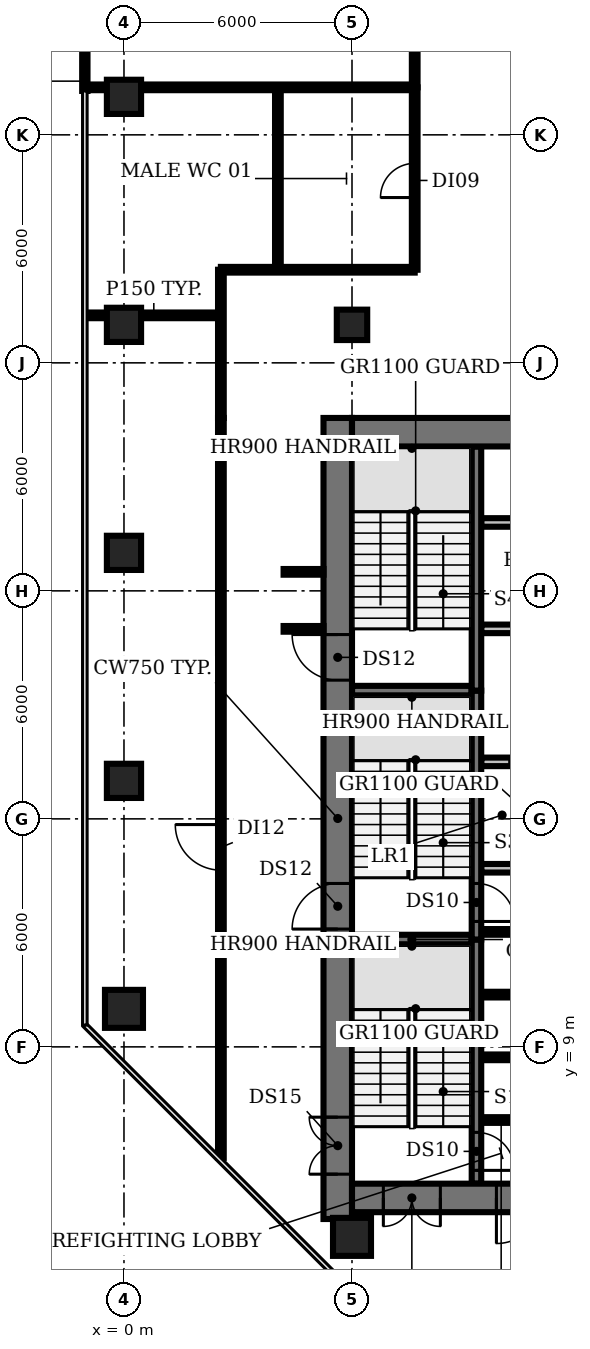
"""IFC4 building model, lengths in metres.
Left out: names, types, materials, properties, quantities, classifications, styles, units other than length and angle.
Written with IfcOpenShell. Run it as: python <this file> out.ifc"""

import sys

from ifc_helpers import new_model, si_unit, direction, frame, frame_2d, origin, origin_2d, place, context, subcontext, project, spatial, rectangle, circle, extrude, element, fill, save


model = new_model("IFC4")
c1 = context("Model", 3, precision=1e-05, world=origin(), true_north=direction((0.0, 1.0)))
c2 = subcontext(c1, "Body", "Model", "MODEL_VIEW")
j1 = project(units=[si_unit("LENGTHUNIT", "METRE"), si_unit("PLANEANGLEUNIT", "RADIAN")], contexts=[c1])
p1 = place(None, origin())
s1 = spatial("IfcSite", under=j1, at=p1, CompositionType="ELEMENT")
p2 = place(p1, origin())
s2 = spatial("IfcBuilding", under=s1, at=p2, CompositionType="ELEMENT")
p3 = place(p2, frame((0.0, 0.0, 96.2)))
s3 = spatial("IfcBuildingStorey", under=s2, at=p3, CompositionType="ELEMENT", Elevation=96.2)
p4 = place(p3, frame((0.0, 10.0, 0.0), z_axis=(0.0, 0.0, 1.0), x_axis=(1.0, 0.0, 0.0)))
e1 = element("IfcColumn", 1, at=p4, inside=s3, PredefinedType="COLUMN", context=c2, shape_type="SweptSolid", body=[
    extrude(circle(Radius=0.5, at=origin_2d()), origin(), (0.0, 0.0, 1.0), 3.85),
])
for number, where, z_axis, x_axis in (
    (2, (0.0, 16.0, 0.0), (0.0, 0.0, 1.0), (1.0, 0.0, 0.0)),
    (3, (0.0, 22.0, 0.0), (0.0, 0.0, 1.0), (1.0, 0.0, 0.0)),
    (4, (0.0, 28.0, 0.0), (0.0, 0.0, 1.0), (1.0, 0.0, 0.0)),
    (5, (0.0, 34.0, 0.0), (0.0, 0.0, 1.0), (1.0, 0.0, 0.0)),
):
    element("IfcColumn", number, at=place(p3, frame(where, z_axis=z_axis, x_axis=x_axis)), inside=s3, PredefinedType="COLUMN", context=c2, shape_type="SweptSolid", body=[
        extrude(rectangle(XDim=0.9, YDim=0.9, at=origin_2d()), origin(), (0.0, 0.0, 1.0), 3.85),
    ])
p5 = place(p3, frame((6.0, 4.0, 0.0), z_axis=(0.0, 0.0, 1.0), x_axis=(1.0, 0.0, 0.0)))
e6 = element("IfcColumn", 6, at=p5, inside=s3, PredefinedType="COLUMN", context=c2, shape_type="SweptSolid", body=[
    extrude(circle(Radius=0.5, at=origin_2d()), origin(), (0.0, 0.0, 1.0), 3.85),
])
p6 = place(p3, frame((6.0, 28.0, 0.0), z_axis=(0.0, 0.0, 1.0), x_axis=(1.0, 0.0, 0.0)))
e7 = element("IfcColumn", 7, at=p6, inside=s3, PredefinedType="COLUMN", context=c2, shape_type="SweptSolid", body=[
    extrude(rectangle(XDim=0.8, YDim=0.8, at=origin_2d()), origin(), (0.0, 0.0, 1.0), 3.85),
])
p7 = place(p3, frame((-1.03, 40.302, 0.0), z_axis=(0.0, 0.0, 1.0), x_axis=(0.0, -1.0, 0.0)))
e8 = element("IfcWall", 8, at=p7, inside=s3, PredefinedType="SOLIDWALL", context=c2, shape_type="SweptSolid", body=[
    extrude(rectangle(XDim=6.146, YDim=0.14, at=frame_2d((3.073, 0.0))), origin(), (0.0, 0.0, 1.0), 3.85),
])
p8 = place(p7, frame((2.173, 0.0, 0.0)))
e9 = element("IfcOpeningElement", 9, at=p8, cuts=e8, PredefinedType="OPENING", context=c2, shape_type="SweptSolid", body=[
    extrude(rectangle(XDim=1.8, YDim=2.4, at=frame_2d((0.9, 1.2))), frame((0.0, 0.08, 0.0), z_axis=(0.0, -1.0, 0.0), x_axis=(1.0, 0.0, 0.0)), (0.0, 0.0, 1.0), 0.16),
])
for number, where, z_axis, x_axis in (
    (10, (9.4, 7.075, 0.0), (0.0, 0.0, 1.0), (1.0, 0.0, 0.0)),
    (11, (9.4, 8.725, 0.0), (0.0, 0.0, 1.0), (1.0, 0.0, 0.0)),
    (12, (9.4, 10.375, 0.0), (0.0, 0.0, 1.0), (1.0, 0.0, 0.0)),
):
    element("IfcWall", number, at=place(p3, frame(where, z_axis=z_axis, x_axis=x_axis)), inside=s3, PredefinedType="SHEAR", context=c2, shape_type="SweptSolid", body=[
        extrude(rectangle(XDim=1.05, YDim=0.15, at=frame_2d((0.525, 0.0))), origin(), (0.0, 0.0, 1.0), 3.85),
    ])
p9 = place(p3, frame((6.0, 11.825, 0.0), z_axis=(0.0, 0.0, 1.0), x_axis=(1.0, 0.0, 0.0)))
e13 = element("IfcWall", 13, at=p9, inside=s3, PredefinedType="SHEAR", context=c2, shape_type="SweptSolid", body=[
    extrude(rectangle(XDim=3.15, YDim=0.25, at=frame_2d((1.575, 0.0))), origin(), (0.0, 0.0, 1.0), 3.85),
])
p10 = place(p3, frame((9.4, 12.025, 0.0), z_axis=(0.0, 0.0, 1.0), x_axis=(1.0, 0.0, 0.0)))
e14 = element("IfcWall", 14, at=p10, inside=s3, PredefinedType="SHEAR", context=c2, shape_type="SweptSolid", body=[
    extrude(rectangle(XDim=1.05, YDim=0.15, at=frame_2d((0.525, 0.0))), origin(), (0.0, 0.0, 1.0), 3.85),
])
p11 = place(p3, frame((9.4, 13.7, 0.0), z_axis=(0.0, 0.0, 1.0), x_axis=(1.0, 0.0, 0.0)))
e15 = element("IfcWall", 15, at=p11, inside=s3, PredefinedType="PARTITIONING", context=c2, shape_type="SweptSolid", body=[
    extrude(rectangle(XDim=4.0, YDim=0.225, at=frame_2d((2.0, 0.0))), origin(), (0.0, 0.0, 1.0), 3.85),
])
p12 = place(p3, frame((9.4, 16.5, 0.0), z_axis=(0.0, 0.0, 1.0), x_axis=(1.0, 0.0, 0.0)))
e16 = element("IfcWall", 16, at=p12, inside=s3, PredefinedType="PARTITIONING", context=c2, shape_type="SweptSolid", body=[
    extrude(rectangle(XDim=14.6, YDim=0.225, at=frame_2d((7.3, 0.0))), origin(), (0.0, 0.0, 1.0), 3.85),
])
p13 = place(p12, frame((0.75, 0.0, 0.0)))
e17 = element("IfcOpeningElement", 17, at=p13, cuts=e16, PredefinedType="OPENING", context=c2, shape_type="SweptSolid", body=[
    extrude(rectangle(XDim=1.1, YDim=2.1, at=frame_2d((0.55, 1.05))), frame((0.0, 0.123, 0.0), z_axis=(0.0, -1.0, 0.0), x_axis=(1.0, 0.0, 0.0)), (0.0, 0.0, 1.0), 0.245),
])
p14 = place(p12, frame((3.55, 0.0, 0.0)))
e18 = element("IfcOpeningElement", 18, at=p14, cuts=e16, PredefinedType="OPENING", context=c2, shape_type="SweptSolid", body=[
    extrude(rectangle(XDim=1.1, YDim=2.1, at=frame_2d((0.55, 1.05))), frame((0.0, 0.123, 0.0), z_axis=(0.0, -1.0, 0.0), x_axis=(1.0, 0.0, 0.0)), (0.0, 0.0, 1.0), 0.245),
])
p15 = place(p12, frame((6.35, 0.0, 0.0)))
e19 = element("IfcOpeningElement", 19, at=p15, cuts=e16, PredefinedType="OPENING", context=c2, shape_type="SweptSolid", body=[
    extrude(rectangle(XDim=1.1, YDim=2.1, at=frame_2d((0.55, 1.05))), frame((0.0, 0.123, 0.0), z_axis=(0.0, -1.0, 0.0), x_axis=(1.0, 0.0, 0.0)), (0.0, 0.0, 1.0), 0.245),
])
p16 = place(p12, frame((9.15, 0.0, 0.0)))
e20 = element("IfcOpeningElement", 20, at=p16, cuts=e16, PredefinedType="OPENING", context=c2, shape_type="SweptSolid", body=[
    extrude(rectangle(XDim=1.1, YDim=2.1, at=frame_2d((0.55, 1.05))), frame((0.0, 0.123, 0.0), z_axis=(0.0, -1.0, 0.0), x_axis=(1.0, 0.0, 0.0)), (0.0, 0.0, 1.0), 0.245),
])
p17 = place(p12, frame((11.647, 0.0, 0.0)))
e21 = element("IfcOpeningElement", 21, at=p17, cuts=e16, PredefinedType="OPENING", context=c2, shape_type="SweptSolid", body=[
    extrude(rectangle(XDim=0.9, YDim=2.1, at=frame_2d((0.45, 1.05))), frame((0.0, 0.123, 0.0), z_axis=(0.0, -1.0, 0.0), x_axis=(1.0, 0.0, 0.0)), (0.0, 0.0, 1.0), 0.245),
])
p18 = place(p12, frame((13.423, 0.0, 0.0)))
e22 = element("IfcOpeningElement", 22, at=p18, cuts=e16, PredefinedType="OPENING", context=c2, shape_type="SweptSolid", body=[
    extrude(rectangle(XDim=0.9, YDim=2.1, at=frame_2d((0.45, 1.05))), frame((0.0, 0.123, 0.0), z_axis=(0.0, -1.0, 0.0), x_axis=(1.0, 0.0, 0.0)), (0.0, 0.0, 1.0), 0.245),
])
p19 = place(p3, frame((6.0, 18.375, 0.0), z_axis=(0.0, 0.0, 1.0), x_axis=(1.0, 0.0, 0.0)))
e23 = element("IfcWall", 23, at=p19, inside=s3, PredefinedType="SHEAR", context=c2, shape_type="SweptSolid", body=[
    extrude(rectangle(XDim=3.15, YDim=0.25, at=frame_2d((1.575, 0.0))), origin(), (0.0, 0.0, 1.0), 3.85),
])
p20 = place(p3, frame((24.0, 20.0, 0.0), z_axis=(0.0, 0.0, 1.0), x_axis=(-1.0, 0.0, 0.0)))
e24 = element("IfcWall", 24, at=p20, inside=s3, PredefinedType="PARTITIONING", context=c2, shape_type="SweptSolid", body=[
    extrude(rectangle(XDim=14.6, YDim=0.225, at=frame_2d((7.3, 0.0))), origin(), (0.0, 0.0, 1.0), 3.85),
])
p21 = place(p20, frame((12.5, 0.0, 0.0)))
e25 = element("IfcOpeningElement", 25, at=p21, cuts=e24, PredefinedType="OPENING", context=c2, shape_type="SweptSolid", body=[
    extrude(rectangle(XDim=1.0, YDim=2.1, at=frame_2d((0.5, 1.05))), frame((0.0, 0.123, 0.0), z_axis=(0.0, -1.0, 0.0), x_axis=(1.0, 0.0, 0.0)), (0.0, 0.0, 1.0), 0.245),
])
p22 = place(p20, frame((8.825, 0.0, 0.0)))
e26 = element("IfcOpeningElement", 26, at=p22, cuts=e24, PredefinedType="OPENING", context=c2, shape_type="SweptSolid", body=[
    extrude(rectangle(XDim=1.0, YDim=2.1, at=frame_2d((0.5, 1.05))), frame((0.0, 0.123, 0.0), z_axis=(0.0, -1.0, 0.0), x_axis=(1.0, 0.0, 0.0)), (0.0, 0.0, 1.0), 0.245),
])
p23 = place(p20, frame((4.925, 0.0, 0.0)))
e27 = element("IfcOpeningElement", 27, at=p23, cuts=e24, PredefinedType="OPENING", context=c2, shape_type="SweptSolid", body=[
    extrude(rectangle(XDim=1.0, YDim=2.1, at=frame_2d((0.5, 1.05))), frame((0.0, 0.123, 0.0), z_axis=(0.0, -1.0, 0.0), x_axis=(1.0, 0.0, 0.0)), (0.0, 0.0, 1.0), 0.245),
])
p24 = place(p20, frame((2.137, 0.0, 0.0)))
e28 = element("IfcOpeningElement", 28, at=p24, cuts=e24, PredefinedType="OPENING", context=c2, shape_type="SweptSolid", body=[
    extrude(rectangle(XDim=0.9, YDim=2.1, at=frame_2d((0.45, 1.05))), frame((0.0, 0.123, 0.0), z_axis=(0.0, -1.0, 0.0), x_axis=(1.0, 0.0, 0.0)), (0.0, 0.0, 1.0), 0.245),
])
p25 = place(p20, frame((0.363, 0.0, 0.0)))
e29 = element("IfcOpeningElement", 29, at=p25, cuts=e24, PredefinedType="OPENING", context=c2, shape_type="SweptSolid", body=[
    extrude(rectangle(XDim=0.9, YDim=2.1, at=frame_2d((0.45, 1.05))), frame((0.0, 0.123, 0.0), z_axis=(0.0, -1.0, 0.0), x_axis=(1.0, 0.0, 0.0)), (0.0, 0.0, 1.0), 0.245),
])
p26 = place(p3, frame((9.4, 22.8, 0.0), z_axis=(0.0, 0.0, 1.0), x_axis=(1.0, 0.0, 0.0)))
e30 = element("IfcWall", 30, at=p26, inside=s3, PredefinedType="PARTITIONING", context=c2, shape_type="SweptSolid", body=[
    extrude(rectangle(XDim=14.6, YDim=0.225, at=frame_2d((7.3, 0.0))), origin(), (0.0, 0.0, 1.0), 3.85),
])
p27 = place(p3, frame((9.275, 11.825, 0.0), z_axis=(0.0, 0.0, 1.0), x_axis=(0.0, -1.0, 0.0)))
e31 = element("IfcWall", 31, at=p27, inside=s3, PredefinedType="SHEAR", context=c2, shape_type="SweptSolid", body=[
    extrude(rectangle(XDim=6.425, YDim=0.25, at=frame_2d((3.212, 0.0))), origin(), (0.0, 0.0, 1.0), 3.85),
])
p28 = place(p27, frame((5.075, 0.0, 0.0)))
e32 = element("IfcOpeningElement", 32, at=p28, cuts=e31, PredefinedType="OPENING", context=c2, shape_type="SweptSolid", body=[
    extrude(rectangle(XDim=1.0, YDim=2.1, at=frame_2d((0.5, 1.05))), frame((0.0, 0.135, 0.0), z_axis=(0.0, -1.0, 0.0), x_axis=(1.0, 0.0, 0.0)), (0.0, 0.0, 1.0), 0.27),
])
p29 = place(p3, frame((9.275, 18.375, 0.0), z_axis=(0.0, 0.0, 1.0), x_axis=(0.0, -1.0, 0.0)))
e33 = element("IfcWall", 33, at=p29, inside=s3, PredefinedType="SHEAR", context=c2, shape_type="SweptSolid", body=[
    extrude(rectangle(XDim=6.55, YDim=0.25, at=frame_2d((3.275, 0.0))), origin(), (0.0, 0.0, 1.0), 3.85),
])
p30 = place(p29, frame((5.075, 0.0, 0.0)))
e34 = element("IfcOpeningElement", 34, at=p30, cuts=e33, PredefinedType="OPENING", context=c2, shape_type="SweptSolid", body=[
    extrude(rectangle(XDim=1.0, YDim=2.1, at=frame_2d((0.5, 1.05))), frame((0.0, 0.135, 0.0), z_axis=(0.0, -1.0, 0.0), x_axis=(1.0, 0.0, 0.0)), (0.0, 0.0, 1.0), 0.27),
])
p31 = place(p3, frame((9.275, 18.375, 0.0), z_axis=(0.0, 0.0, 1.0), x_axis=(0.0, 1.0, 0.0)))
e35 = element("IfcWall", 35, at=p31, inside=s3, PredefinedType="SHEAR", context=c2, shape_type="SweptSolid", body=[
    extrude(rectangle(XDim=6.425, YDim=0.25, at=frame_2d((3.212, 0.0))), origin(), (0.0, 0.0, 1.0), 3.85),
])
p32 = place(p3, frame((5.625, 4.47, 0.0), z_axis=(0.0, 0.0, 1.0), x_axis=(0.0, 1.0, 0.0)))
e36 = element("IfcWall", 36, at=p32, inside=s3, PredefinedType="SHEAR", context=c2, shape_type="SweptSolid", body=[
    extrude(rectangle(XDim=21.08, YDim=0.75, at=frame_2d((10.54, 0.0))), origin(), (0.0, 0.0, 1.0), 3.85),
])
p33 = place(p32, frame((1.18, 0.0, 0.0)))
e37 = element("IfcOpeningElement", 37, at=p33, cuts=e36, PredefinedType="OPENING", context=c2, shape_type="SweptSolid", body=[
    extrude(rectangle(XDim=1.5, YDim=2.1, at=frame_2d((0.75, 1.05))), frame((0.0, 0.385, 0.0), z_axis=(0.0, -1.0, 0.0), x_axis=(1.0, 0.0, 0.0)), (0.0, 0.0, 1.0), 0.77),
])
p34 = place(p32, frame((7.63, 0.0, 0.0)))
e38 = element("IfcOpeningElement", 38, at=p34, cuts=e36, PredefinedType="OPENING", context=c2, shape_type="SweptSolid", body=[
    extrude(rectangle(XDim=1.2, YDim=2.1, at=frame_2d((0.6, 1.05))), frame((0.0, 0.385, 0.0), z_axis=(0.0, -1.0, 0.0), x_axis=(1.0, 0.0, 0.0)), (0.0, 0.0, 1.0), 0.77),
])
p35 = place(p32, frame((14.18, 0.0, 0.0)))
e39 = element("IfcOpeningElement", 39, at=p35, cuts=e36, PredefinedType="OPENING", context=c2, shape_type="SweptSolid", body=[
    extrude(rectangle(XDim=1.2, YDim=2.1, at=frame_2d((0.6, 1.05))), frame((0.0, 0.385, 0.0), z_axis=(0.0, -1.0, 0.0), x_axis=(1.0, 0.0, 0.0)), (0.0, 0.0, 1.0), 0.77),
])
p36 = place(p3, frame((24.0, 5.025, 0.0), z_axis=(0.0, 0.0, 1.0), x_axis=(-1.0, 0.0, 0.0)))
e40 = element("IfcWall", 40, at=p36, inside=s3, PredefinedType="SHEAR", context=c2, shape_type="SweptSolid", body=[
    extrude(rectangle(XDim=18.0, YDim=0.75, at=frame_2d((9.0, 0.0))), origin(), (0.0, 0.0, 1.0), 3.85),
])
p37 = place(p36, frame((0.825, 0.0, 0.0)))
e41 = element("IfcOpeningElement", 41, at=p37, cuts=e40, PredefinedType="OPENING", context=c2, shape_type="SweptSolid", body=[
    extrude(rectangle(XDim=1.5, YDim=2.1, at=frame_2d((0.75, 1.05))), frame((0.0, 0.385, 0.0), z_axis=(0.0, -1.0, 0.0), x_axis=(1.0, 0.0, 0.0)), (0.0, 0.0, 1.0), 0.77),
])
p38 = place(p36, frame((15.675, 0.0, 0.0)))
e42 = element("IfcOpeningElement", 42, at=p38, cuts=e40, PredefinedType="OPENING", context=c2, shape_type="SweptSolid", body=[
    extrude(rectangle(XDim=1.5, YDim=2.1, at=frame_2d((0.75, 1.05))), frame((0.0, 0.385, 0.0), z_axis=(0.0, -1.0, 0.0), x_axis=(1.0, 0.0, 0.0)), (0.0, 0.0, 1.0), 0.77),
])
p39 = place(p36, frame((13.0, 0.0, 0.0)))
e43 = element("IfcOpeningElement", 43, at=p39, cuts=e40, PredefinedType="OPENING", context=c2, shape_type="SweptSolid", body=[
    extrude(rectangle(XDim=1.2, YDim=2.1, at=frame_2d((0.6, 1.05))), frame((0.0, 0.385, 0.0), z_axis=(0.0, -1.0, 0.0), x_axis=(1.0, 0.0, 0.0)), (0.0, 0.0, 1.0), 0.77),
])
p40 = place(p36, frame((4.35, 0.0, 0.0)))
e44 = element("IfcOpeningElement", 44, at=p40, cuts=e40, PredefinedType="OPENING", context=c2, shape_type="SweptSolid", body=[
    extrude(rectangle(XDim=1.0, YDim=2.1, at=frame_2d((0.5, 1.05))), frame((0.0, 0.385, 0.0), z_axis=(0.0, -1.0, 0.0), x_axis=(1.0, 0.0, 0.0)), (0.0, 0.0, 1.0), 0.77),
])
p41 = place(p3, frame((6.0, 25.175, 0.0), z_axis=(0.0, 0.0, 1.0), x_axis=(1.0, 0.0, 0.0)))
e45 = element("IfcWall", 45, at=p41, inside=s3, PredefinedType="SHEAR", context=c2, shape_type="SweptSolid", body=[
    extrude(rectangle(XDim=18.0, YDim=0.75, at=frame_2d((9.0, 0.0))), origin(), (0.0, 0.0, 1.0), 3.85),
])
p42 = place(p3, frame((-0.98, 28.25, 0.0), z_axis=(0.0, 0.0, 1.0), x_axis=(1.0, 0.0, 0.0)))
e46 = element("IfcWall", 46, at=p42, inside=s3, PredefinedType="PARTITIONING", context=c2, shape_type="SweptSolid", body=[
    extrude(rectangle(XDim=3.53, YDim=0.15, at=frame_2d((1.765, 0.0))), origin(), (0.0, 0.0, 1.0), 2.83),
])
p43 = place(p3, frame((-0.965, 34.25, 0.0), z_axis=(0.0, 0.0, 1.0), x_axis=(1.0, 0.0, 0.0)))
e47 = element("IfcWall", 47, at=p43, inside=s3, PredefinedType="PARTITIONING", context=c2, shape_type="SweptSolid", body=[
    extrude(rectangle(XDim=8.615, YDim=0.15, at=frame_2d((4.308, 0.0))), origin(), (0.0, 0.0, 1.0), 2.83),
])
p44 = place(p3, frame((2.55, 6.078, 0.0), z_axis=(0.0, 0.0, 1.0), x_axis=(0.0, 1.0, 0.0)))
e48 = element("IfcWall", 48, at=p44, inside=s3, PredefinedType="PARTITIONING", context=c2, shape_type="SweptSolid", body=[
    extrude(rectangle(XDim=19.472, YDim=0.15, at=frame_2d((9.736, 0.0))), origin(), (0.0, 0.0, 1.0), 2.83),
])
p45 = place(p44, frame((7.572, 0.0, 0.0)))
e49 = element("IfcOpeningElement", 49, at=p45, cuts=e48, PredefinedType="OPENING", context=c2, shape_type="SweptSolid", body=[
    extrude(rectangle(XDim=1.2, YDim=2.1, at=frame_2d((0.6, 1.05))), frame((0.0, 0.085, 0.0), z_axis=(0.0, -1.0, 0.0), x_axis=(1.0, 0.0, 0.0)), (0.0, 0.0, 1.0), 0.17),
])
p46 = place(p3, frame((2.55, 25.55, 0.0), z_axis=(0.0, 0.0, 1.0), x_axis=(0.0, 1.0, 0.0)))
e50 = element("IfcWall", 50, at=p46, inside=s3, PredefinedType="PARTITIONING", context=c2, shape_type="SweptSolid", body=[
    extrude(rectangle(XDim=3.9, YDim=0.15, at=frame_2d((1.95, 0.0))), origin(), (0.0, 0.0, 1.0), 2.83),
])
p47 = place(p3, frame((2.55, 29.45, 0.0), z_axis=(0.0, 0.0, 1.0), x_axis=(1.0, 0.0, 0.0)))
e51 = element("IfcWall", 51, at=p47, inside=s3, PredefinedType="PARTITIONING", context=c2, shape_type="SweptSolid", body=[
    extrude(rectangle(XDim=5.1, YDim=0.15, at=frame_2d((2.55, 0.0))), origin(), (0.0, 0.0, 1.0), 2.83),
])
p48 = place(p3, frame((4.05, 29.45, 0.0), z_axis=(0.0, 0.0, 1.0), x_axis=(0.0, 1.0, 0.0)))
e52 = element("IfcWall", 52, at=p48, inside=s3, PredefinedType="PARTITIONING", context=c2, shape_type="SweptSolid", body=[
    extrude(rectangle(XDim=4.8, YDim=0.15, at=frame_2d((2.4, 0.0))), origin(), (0.0, 0.0, 1.0), 2.83),
])
for number, where, z_axis, x_axis in (
    (53, (4.2, 20.0, 0.0), (0.0, 0.0, 1.0), (1.0, 0.0, 0.0)),
    (54, (4.2, 21.5, 0.0), (0.0, 0.0, 1.0), (1.0, 0.0, 0.0)),
):
    element("IfcWall", number, at=place(p3, frame(where, z_axis=z_axis, x_axis=x_axis)), inside=s3, PredefinedType="PARTITIONING", context=c2, shape_type="SweptSolid", body=[
        extrude(rectangle(XDim=1.05, YDim=0.15, at=frame_2d((0.525, 0.0))), origin(), (0.0, 0.0, 1.0), 2.83),
    ])
p49 = place(p3, frame((7.65, 29.45, 0.0), z_axis=(0.0, 0.0, 1.0), x_axis=(0.0, 1.0, 0.0)))
e55 = element("IfcWall", 55, at=p49, inside=s3, PredefinedType="PARTITIONING", context=c2, shape_type="SweptSolid", body=[
    extrude(rectangle(XDim=4.8, YDim=0.15, at=frame_2d((2.4, 0.0))), origin(), (0.0, 0.0, 1.0), 2.83),
])
p50 = place(p49, frame((1.9, 0.0, 0.0)))
e56 = element("IfcOpeningElement", 56, at=p50, cuts=e55, PredefinedType="OPENING", context=c2, shape_type="SweptSolid", body=[
    extrude(rectangle(XDim=0.9, YDim=2.1, at=frame_2d((0.45, 1.05))), frame((0.0, 0.085, 0.0), z_axis=(0.0, -1.0, 0.0), x_axis=(1.0, 0.0, 0.0)), (0.0, 0.0, 1.0), 0.17),
])
p51 = place(p3, frame((7.65, 34.25, 0.0), z_axis=(0.0, 0.0, 1.0), x_axis=(0.0, 1.0, 0.0)))
e57 = element("IfcWall", 57, at=p51, inside=s3, PredefinedType="PARTITIONING", context=c2, shape_type="SweptSolid", body=[
    extrude(rectangle(XDim=4.75, YDim=0.15, at=frame_2d((2.375, 0.0))), origin(), (0.0, 0.0, 1.0), 2.83),
])
p52 = place(p51, frame((1.75, 0.0, 0.0)))
e58 = element("IfcOpeningElement", 58, at=p52, cuts=e57, PredefinedType="OPENING", context=c2, shape_type="SweptSolid", body=[
    extrude(rectangle(XDim=1.0, YDim=2.1, at=frame_2d((0.5, 1.05))), frame((0.0, 0.085, 0.0), z_axis=(0.0, -1.0, 0.0), x_axis=(1.0, 0.0, 0.0)), (0.0, 0.0, 1.0), 0.17),
])
p53 = place(p28, origin())
e59 = element("IfcDoor", 59, at=p53, inside=s3, OperationType="SINGLE_SWING_RIGHT", PredefinedType="DOOR", context=c2, shape_type="SweptSolid", body=[
    extrude(rectangle(XDim=1.0, YDim=2.1, at=frame_2d((0.5, 1.05))), frame((0.0, 0.025, 0.0), z_axis=(0.0, -1.0, 0.0), x_axis=(1.0, 0.0, 0.0)), (0.0, 0.0, 1.0), 0.05),
])
fill(e32, e59)
p54 = place(p30, origin())
e60 = element("IfcDoor", 60, at=p54, inside=s3, OperationType="SINGLE_SWING_RIGHT", PredefinedType="DOOR", context=c2, shape_type="SweptSolid", body=[
    extrude(rectangle(XDim=1.0, YDim=2.1, at=frame_2d((0.5, 1.05))), frame((0.0, 0.025, 0.0), z_axis=(0.0, -1.0, 0.0), x_axis=(1.0, 0.0, 0.0)), (0.0, 0.0, 1.0), 0.05),
])
fill(e34, e60)
p55 = place(p33, origin())
e61 = element("IfcDoor", 61, at=p55, inside=s3, OperationType="DOUBLE_DOOR_SINGLE_SWING", PredefinedType="DOOR", context=c2, shape_type="SweptSolid", body=[
    extrude(rectangle(XDim=1.5, YDim=2.1, at=frame_2d((0.75, 1.05))), frame((0.0, 0.025, 0.0), z_axis=(0.0, -1.0, 0.0), x_axis=(1.0, 0.0, 0.0)), (0.0, 0.0, 1.0), 0.05),
])
fill(e37, e61)
p56 = place(p34, origin())
e62 = element("IfcDoor", 62, at=p56, inside=s3, OperationType="SINGLE_SWING_LEFT", PredefinedType="DOOR", context=c2, shape_type="SweptSolid", body=[
    extrude(rectangle(XDim=1.2, YDim=2.1, at=frame_2d((0.6, 1.05))), frame((0.0, 0.025, 0.0), z_axis=(0.0, -1.0, 0.0), x_axis=(1.0, 0.0, 0.0)), (0.0, 0.0, 1.0), 0.05),
])
fill(e38, e62)
p57 = place(p35, origin())
e63 = element("IfcDoor", 63, at=p57, inside=s3, OperationType="SINGLE_SWING_RIGHT", PredefinedType="DOOR", context=c2, shape_type="SweptSolid", body=[
    extrude(rectangle(XDim=1.2, YDim=2.1, at=frame_2d((0.6, 1.05))), frame((0.0, 0.025, 0.0), z_axis=(0.0, -1.0, 0.0), x_axis=(1.0, 0.0, 0.0)), (0.0, 0.0, 1.0), 0.05),
])
fill(e39, e63)
p58 = place(p38, origin())
e64 = element("IfcDoor", 64, at=p58, inside=s3, OperationType="DOUBLE_DOOR_SINGLE_SWING", PredefinedType="DOOR", context=c2, shape_type="SweptSolid", body=[
    extrude(rectangle(XDim=1.5, YDim=2.1, at=frame_2d((0.75, 1.05))), frame((0.0, 0.025, 0.0), z_axis=(0.0, -1.0, 0.0), x_axis=(1.0, 0.0, 0.0)), (0.0, 0.0, 1.0), 0.05),
])
fill(e42, e64)
p59 = place(p39, origin())
e65 = element("IfcDoor", 65, at=p59, inside=s3, OperationType="SINGLE_SWING_RIGHT", PredefinedType="DOOR", context=c2, shape_type="SweptSolid", body=[
    extrude(rectangle(XDim=1.2, YDim=2.1, at=frame_2d((0.6, 1.05))), frame((0.0, 0.025, 0.0), z_axis=(0.0, -1.0, 0.0), x_axis=(1.0, 0.0, 0.0)), (0.0, 0.0, 1.0), 0.05),
])
fill(e43, e65)
p60 = place(p45, origin())
e66 = element("IfcDoor", 66, at=p60, inside=s3, OperationType="SINGLE_SWING_RIGHT", PredefinedType="DOOR", context=c2, shape_type="SweptSolid", body=[
    extrude(rectangle(XDim=1.2, YDim=2.1, at=frame_2d((0.6, 1.05))), frame((0.0, 0.025, 0.0), z_axis=(0.0, -1.0, 0.0), x_axis=(1.0, 0.0, 0.0)), (0.0, 0.0, 1.0), 0.05),
])
fill(e49, e66)
p61 = place(p50, origin())
e67 = element("IfcDoor", 67, at=p61, inside=s3, OperationType="SINGLE_SWING_LEFT", PredefinedType="DOOR", context=c2, shape_type="SweptSolid", body=[
    extrude(rectangle(XDim=0.9, YDim=2.1, at=frame_2d((0.45, 1.05))), frame((0.0, 0.025, 0.0), z_axis=(0.0, -1.0, 0.0), x_axis=(1.0, 0.0, 0.0)), (0.0, 0.0, 1.0), 0.05),
])
fill(e56, e67)
save(model, sys.argv[1])
